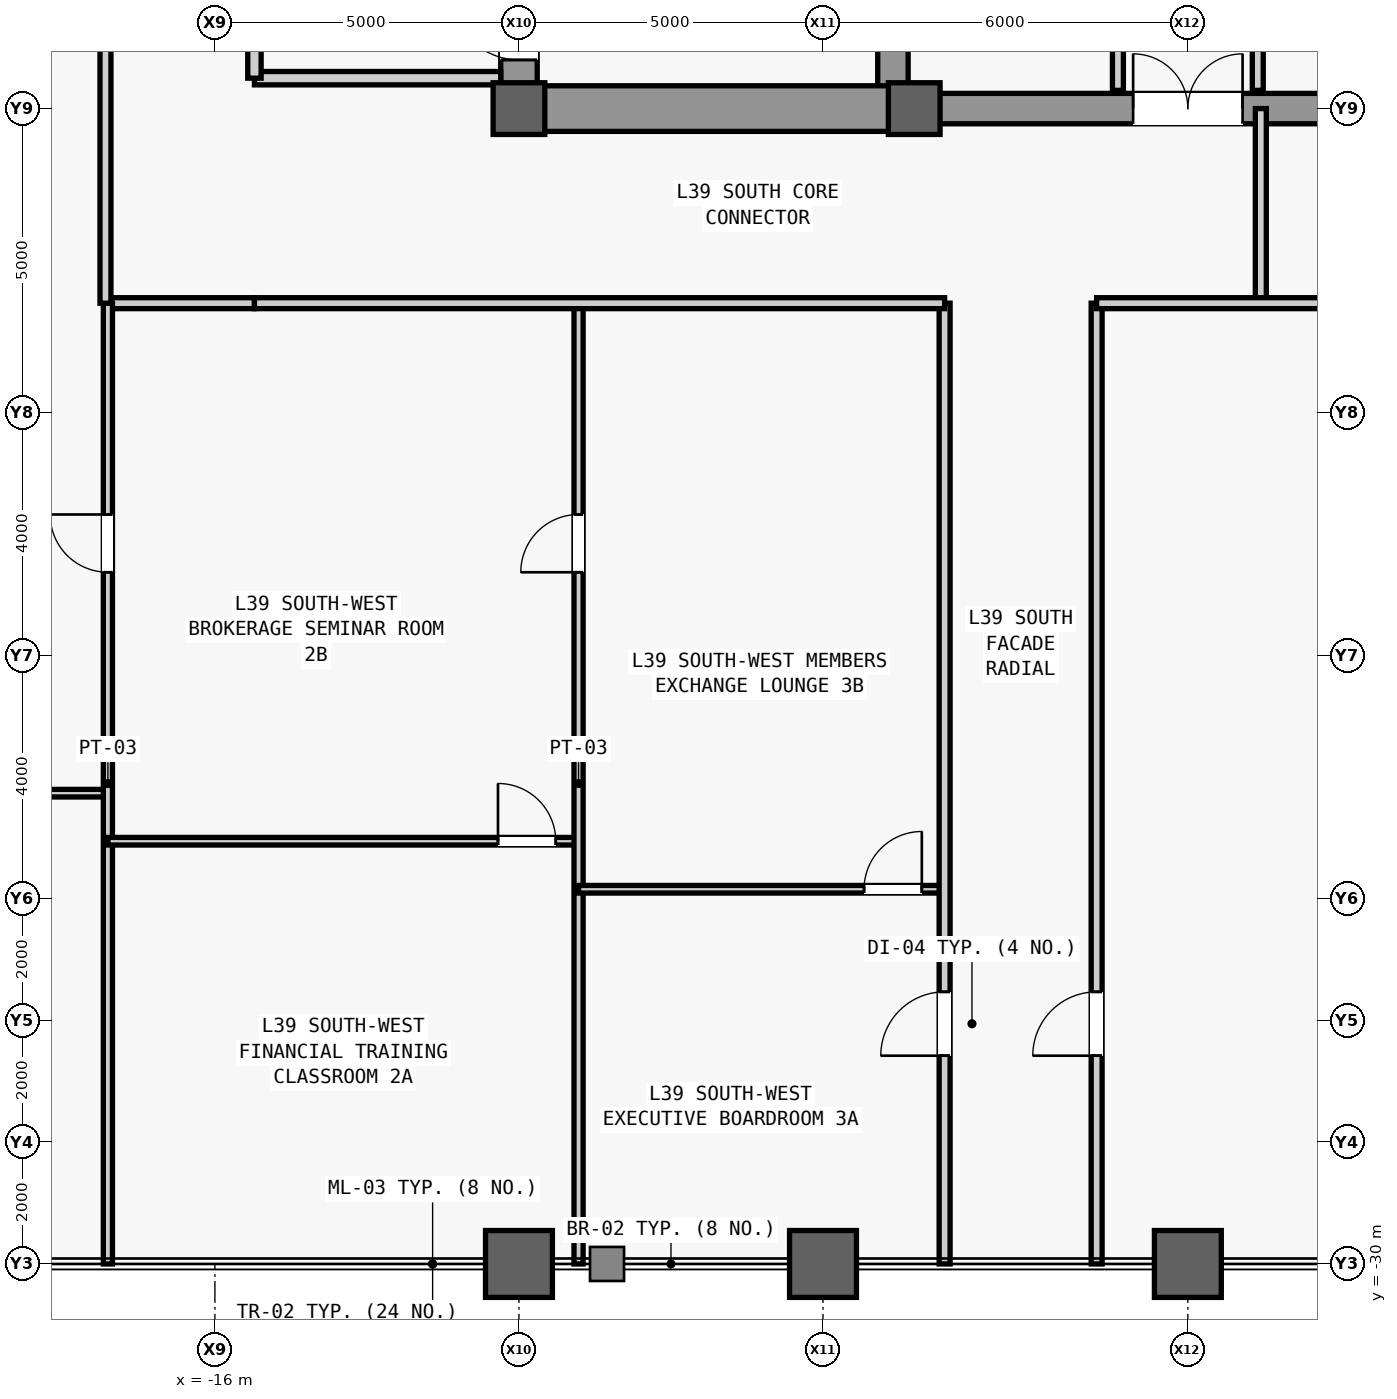
"""IFC4 building model, lengths in metres.
Left out: names, types, materials, properties, quantities, classifications, styles, units other than length and angle.
Written with IfcOpenShell. Run it as: python <this file> out.ifc"""

import sys

from ifc_helpers import new_model, si_unit, direction, frame, frame_2d, origin, origin_2d, place, context, subcontext, project, spatial, rectangle, hollow_rectangle, extrude, source, transform, mapped, element, fill, save


model = new_model("IFC4")
c1 = context("Model", 3, precision=1e-05, world=origin(), true_north=direction((0.0, 1.0)))
c2 = subcontext(c1, "Body", "Model", "MODEL_VIEW")
j1 = project(units=[si_unit("LENGTHUNIT", "METRE"), si_unit("PLANEANGLEUNIT", "RADIAN")], contexts=[c1])
p1 = place(None, origin())
s1 = spatial("IfcSite", under=j1, at=p1, CompositionType="ELEMENT")
p2 = place(p1, origin())
s2 = spatial("IfcBuilding", under=s1, at=p2, CompositionType="ELEMENT")
p3 = place(p2, frame((0.0, 0.0, 171.1)))
s3 = spatial("IfcBuildingStorey", under=s2, at=p3, CompositionType="ELEMENT", Elevation=171.1)
m1 = source(origin(), c2, "Body", "SweptSolid", [
    extrude(rectangle(XDim=22.0, YDim=0.6, at=frame_2d((11.0, 0.0))), origin(), (0.0, 0.0, 1.0), 3.78),
])
p4 = place(p3, frame((-11.0, -11.0, 0.0), z_axis=(0.0, 0.0, 1.0), x_axis=(0.0, 1.0, 0.0)))
e1 = element("IfcWall", 1, at=p4, inside=s3, PredefinedType="SHEAR", context=c2, shape_type="MappedRepresentation", body=[
    mapped(m1, transform((0.0, 0.0, 0.0), scale=1.0)),
])
m2 = source(origin(), c2, "Body", "SweptSolid", [
    extrude(rectangle(XDim=1.1, YDim=2.2, at=frame_2d((0.55, 1.1))), frame((0.0, 0.31, 0.0), z_axis=(0.0, -1.0, 0.0), x_axis=(1.0, 0.0, 0.0)), (0.0, 0.0, 1.0), 0.62),
])
p5 = place(p4, frame((0.8, 0.0, 0.0)))
e2 = element("IfcOpeningElement", 2, at=p5, cuts=e1, PredefinedType="OPENING", context=c2, shape_type="MappedRepresentation", body=[
    mapped(m2, transform((0.0, 0.0, 0.0), scale=1.0)),
])
p6 = place(p4, frame((12.5, 0.0, 0.0)))
e3 = element("IfcOpeningElement", 3, at=p6, cuts=e1, PredefinedType="OPENING", context=c2, shape_type="MappedRepresentation", body=[
    mapped(m2, transform((0.0, 0.0, 0.0), scale=1.0)),
])
m3 = source(origin(), c2, "Body", "SweptSolid", [
    extrude(rectangle(XDim=0.9, YDim=2.15, at=frame_2d((0.45, 1.075))), frame((0.0, 0.31, 0.0), z_axis=(0.0, -1.0, 0.0), x_axis=(1.0, 0.0, 0.0)), (0.0, 0.0, 1.0), 0.62),
])
p7 = place(p4, frame((6.85, 0.0, 0.0)))
e4 = element("IfcOpeningElement", 4, at=p7, cuts=e1, PredefinedType="OPENING", context=c2, shape_type="MappedRepresentation", body=[
    mapped(m3, transform((0.0, 0.0, 0.0), scale=1.0)),
])
m4 = source(origin(), c2, "Body", "SweptSolid", [
    extrude(rectangle(XDim=1.3, YDim=2.3, at=frame_2d((0.65, 1.15))), frame((0.0, 0.31, 0.0), z_axis=(0.0, -1.0, 0.0), x_axis=(1.0, 0.0, 0.0)), (0.0, 0.0, 1.0), 0.62),
])
p8 = place(p4, frame((2.7, 0.0, 0.0)))
e5 = element("IfcOpeningElement", 5, at=p8, cuts=e1, PredefinedType="OPENING", context=c2, shape_type="MappedRepresentation", body=[
    mapped(m4, transform((0.0, 0.0, 0.0), scale=1.0)),
])
m5 = source(origin(), c2, "Body", "SweptSolid", [
    extrude(rectangle(XDim=21.4, YDim=0.5, at=frame_2d((10.7, 0.0))), origin(), (0.0, 0.0, 1.0), 3.78),
])
p9 = place(p3, frame((-4.85, -10.7, 0.0), z_axis=(0.0, 0.0, 1.0), x_axis=(0.0, 1.0, 0.0)))
e6 = element("IfcWall", 6, at=p9, inside=s3, PredefinedType="SHEAR", context=c2, shape_type="MappedRepresentation", body=[
    mapped(m5, transform((0.0, 0.0, 0.0), scale=1.0)),
])
m6 = source(origin(), c2, "Body", "SweptSolid", [
    extrude(rectangle(XDim=5.85, YDim=0.75, at=frame_2d((2.925, 0.0))), origin(), (0.0, 0.0, 1.0), 3.78),
])
p10 = place(p3, frame((-10.7, -11.0, 0.0), z_axis=(0.0, 0.0, 1.0), x_axis=(1.0, 0.0, 0.0)))
e7 = element("IfcWall", 7, at=p10, inside=s3, PredefinedType="SHEAR", context=c2, shape_type="MappedRepresentation", body=[
    mapped(m6, transform((0.0, 0.0, 0.0), scale=1.0)),
])
m7 = source(origin(), c2, "Body", "SweptSolid", [
    extrude(rectangle(XDim=9.2, YDim=0.5, at=frame_2d((4.6, 0.0))), origin(), (0.0, 0.0, 1.0), 3.78),
])
p11 = place(p3, frame((-4.6, -11.0, 0.0), z_axis=(0.0, 0.0, 1.0), x_axis=(1.0, 0.0, 0.0)))
e8 = element("IfcWall", 8, at=p11, inside=s3, PredefinedType="SHEAR", context=c2, shape_type="MappedRepresentation", body=[
    mapped(m7, transform((0.0, 0.0, 0.0), scale=1.0)),
])
m8 = source(origin(), c2, "Body", "SweptSolid", [
    extrude(rectangle(XDim=1.8, YDim=2.25, at=frame_2d((0.9, 1.125))), frame((0.0, 0.26, 0.0), z_axis=(0.0, -1.0, 0.0), x_axis=(1.0, 0.0, 0.0)), (0.0, 0.0, 1.0), 0.52),
])
p12 = place(p11, frame((3.7, 0.0, 0.0)))
e9 = element("IfcOpeningElement", 9, at=p12, cuts=e8, PredefinedType="OPENING", context=c2, shape_type="MappedRepresentation", body=[
    mapped(m8, transform((0.0, 0.0, 0.0), scale=1.0)),
])
m9 = source(origin(), c2, "Body", "SweptSolid", [
    extrude(hollow_rectangle(XDim=1.1, YDim=1.1, WallThickness=0.06, at=origin_2d()), origin(), (0.0, 0.0, 1.0), 4.0),
])
p13 = place(p3, frame((-11.0, -30.0, 0.0), z_axis=(0.0, 0.0, 1.0), x_axis=(1.0, 0.0, 0.0)))
e10 = element("IfcColumn", 10, at=p13, inside=s3, PredefinedType="COLUMN", context=c2, shape_type="MappedRepresentation", body=[
    mapped(m9, transform((0.0, 0.0, 0.0), scale=1.0)),
])
m10 = source(origin(), c2, "Body", "SweptSolid", [
    extrude(rectangle(XDim=0.85, YDim=0.85, at=origin_2d()), origin(), (0.0, 0.0, 1.0), 4.0),
])
p14 = place(p3, frame((-11.0, -11.0, 0.0), z_axis=(0.0, 0.0, 1.0), x_axis=(1.0, 0.0, 0.0)))
e11 = element("IfcColumn", 11, at=p14, inside=s3, PredefinedType="COLUMN", context=c2, shape_type="MappedRepresentation", body=[
    mapped(m10, transform((0.0, 0.0, 0.0), scale=1.0)),
])
p15 = place(p3, frame((-6.0, -30.0, 0.0), z_axis=(0.0, 0.0, 1.0), x_axis=(1.0, 0.0, 0.0)))
e12 = element("IfcColumn", 12, at=p15, inside=s3, PredefinedType="COLUMN", context=c2, shape_type="MappedRepresentation", body=[
    mapped(m9, transform((0.0, 0.0, 0.0), scale=1.0)),
])
p16 = place(p3, frame((-4.5, -11.0, 0.0), z_axis=(0.0, 0.0, 1.0), x_axis=(1.0, 0.0, 0.0)))
e13 = element("IfcColumn", 13, at=p16, inside=s3, PredefinedType="COLUMN", context=c2, shape_type="MappedRepresentation", body=[
    mapped(m10, transform((0.0, 0.0, 0.0), scale=1.0)),
])
p17 = place(p3, frame((0.0, -30.0, 0.0), z_axis=(0.0, 0.0, 1.0), x_axis=(1.0, 0.0, 0.0)))
e14 = element("IfcColumn", 14, at=p17, inside=s3, PredefinedType="COLUMN", context=c2, shape_type="MappedRepresentation", body=[
    mapped(m9, transform((0.0, 0.0, 0.0), scale=1.0)),
])
m11 = source(origin(), c2, "Body", "SweptSolid", [
    extrude(rectangle(XDim=4.05, YDim=0.22, at=frame_2d((2.025, 0.0))), origin(), (0.0, 0.0, 1.0), 3.78),
])
p18 = place(p3, frame((-15.35, -10.5, 0.0), z_axis=(0.0, 0.0, 1.0), x_axis=(1.0, 0.0, 0.0)))
e15 = element("IfcWall", 15, at=p18, inside=s3, PredefinedType="PARTITIONING", context=c2, shape_type="MappedRepresentation", body=[
    mapped(m11, transform((0.0, 0.0, 0.0), scale=1.0)),
])
m12 = source(origin(), c2, "Body", "SweptSolid", [
    extrude(rectangle(XDim=4.4, YDim=0.22, at=frame_2d((2.2, 0.0))), origin(), (0.0, 0.0, 1.0), 3.78),
])
p19 = place(p3, frame((-15.35, -10.5, 0.0), z_axis=(0.0, 0.0, 1.0), x_axis=(0.0, 1.0, 0.0)))
e16 = element("IfcWall", 16, at=p19, inside=s3, PredefinedType="PARTITIONING", context=c2, shape_type="MappedRepresentation", body=[
    mapped(m12, transform((0.0, 0.0, 0.0), scale=1.0)),
])
m13 = source(origin(), c2, "Body", "SweptSolid", [
    extrude(rectangle(XDim=1.2, YDim=2.2, at=frame_2d((0.6, 1.1))), frame((0.0, 0.12, 0.0), z_axis=(0.0, -1.0, 0.0), x_axis=(1.0, 0.0, 0.0)), (0.0, 0.0, 1.0), 0.24),
])
p20 = place(p19, frame((1.6, 0.0, 0.0)))
e17 = element("IfcOpeningElement", 17, at=p20, cuts=e16, PredefinedType="OPENING", context=c2, shape_type="MappedRepresentation", body=[
    mapped(m13, transform((0.0, 0.0, 0.0), scale=1.0)),
])
m14 = source(origin(), c2, "Body", "SweptSolid", [
    extrude(rectangle(XDim=5.4, YDim=0.18, at=frame_2d((2.7, 0.0))), origin(), (0.0, 0.0, 1.0), 3.78),
])
p21 = place(p3, frame((-1.15, -10.7, 0.0), z_axis=(0.0, 0.0, 1.0), x_axis=(0.0, 1.0, 0.0)))
e18 = element("IfcWall", 18, at=p21, inside=s3, PredefinedType="PARTITIONING", context=c2, shape_type="MappedRepresentation", body=[
    mapped(m14, transform((0.0, 0.0, 0.0), scale=1.0)),
])
m15 = source(origin(), c2, "Body", "SweptSolid", [
    extrude(rectangle(XDim=0.9, YDim=2.15, at=frame_2d((0.45, 1.075))), frame((0.0, 0.1, 0.0), z_axis=(0.0, -1.0, 0.0), x_axis=(1.0, 0.0, 0.0)), (0.0, 0.0, 1.0), 0.2),
])
p22 = place(p21, frame((0.9, 0.0, 0.0)))
e19 = element("IfcOpeningElement", 19, at=p22, cuts=e18, PredefinedType="OPENING", context=c2, shape_type="MappedRepresentation", body=[
    mapped(m15, transform((0.0, 0.0, 0.0), scale=1.0)),
])
p23 = place(p21, frame((3.6, 0.0, 0.0)))
e20 = element("IfcOpeningElement", 20, at=p23, cuts=e18, PredefinedType="OPENING", context=c2, shape_type="MappedRepresentation", body=[
    mapped(m15, transform((0.0, 0.0, 0.0), scale=1.0)),
])
p24 = place(p3, frame((1.15, -10.7, 0.0), z_axis=(0.0, 0.0, 1.0), x_axis=(0.0, 1.0, 0.0)))
e21 = element("IfcWall", 21, at=p24, inside=s3, PredefinedType="PARTITIONING", context=c2, shape_type="MappedRepresentation", body=[
    mapped(m14, transform((0.0, 0.0, 0.0), scale=1.0)),
])
p25 = place(p24, frame((2.25, 0.0, 0.0)))
e22 = element("IfcOpeningElement", 22, at=p25, cuts=e21, PredefinedType="OPENING", context=c2, shape_type="MappedRepresentation", body=[
    mapped(m15, transform((0.0, 0.0, 0.0), scale=1.0)),
])
m16 = source(origin(), c2, "Body", "SweptSolid", [
    extrude(rectangle(XDim=2.45, YDim=0.18, at=frame_2d((1.225, 0.0))), origin(), (0.0, 0.0, 1.0), 3.78),
])
p26 = place(p3, frame((-17.8, -14.2, 0.0), z_axis=(0.0, 0.0, 1.0), x_axis=(1.0, 0.0, 0.0)))
e23 = element("IfcWall", 23, at=p26, inside=s3, PredefinedType="PARTITIONING", context=c2, shape_type="MappedRepresentation", body=[
    mapped(m16, transform((0.0, 0.0, 0.0), scale=1.0)),
])
m17 = source(origin(), c2, "Body", "SweptSolid", [
    extrude(rectangle(XDim=3.2, YDim=0.18, at=frame_2d((1.6, 0.0))), origin(), (0.0, 0.0, 1.0), 3.78),
])
p27 = place(p3, frame((1.2, -14.2, 0.0), z_axis=(0.0, 0.0, 1.0), x_axis=(0.0, 1.0, 0.0)))
e24 = element("IfcWall", 24, at=p27, inside=s3, PredefinedType="PARTITIONING", context=c2, shape_type="MappedRepresentation", body=[
    mapped(m17, transform((0.0, 0.0, 0.0), scale=1.0)),
])
m18 = source(origin(), c2, "Body", "SweptSolid", [
    extrude(rectangle(XDim=7.74, YDim=0.125, at=frame_2d((3.87, 0.0))), origin(), (0.0, 0.0, 1.0), 3.78),
])
p28 = place(p3, frame((-25.5, -22.258, 0.0), z_axis=(0.0, 0.0, 1.0), x_axis=(1.0, 0.0, 0.0)))
e25 = element("IfcWall", 25, at=p28, inside=s3, PredefinedType="PARTITIONING", context=c2, shape_type="MappedRepresentation", body=[
    mapped(m18, transform((0.0, 0.0, 0.0), scale=1.0)),
])
m19 = source(origin(), c2, "Body", "SweptSolid", [
    extrude(rectangle(XDim=0.95, YDim=2.15, at=frame_2d((0.475, 1.075))), frame((0.0, 0.073, 0.0), z_axis=(0.0, -1.0, 0.0), x_axis=(1.0, 0.0, 0.0)), (0.0, 0.0, 1.0), 0.145),
])
p29 = place(p28, frame((2.002, 0.0, 0.0)))
e26 = element("IfcOpeningElement", 26, at=p29, cuts=e25, PredefinedType="OPENING", context=c2, shape_type="MappedRepresentation", body=[
    mapped(m19, transform((0.0, 0.0, 0.0), scale=1.0)),
])
m20 = source(origin(), c2, "Body", "SweptSolid", [
    extrude(rectangle(XDim=15.8, YDim=0.15, at=frame_2d((7.9, 0.0))), origin(), (0.0, 0.0, 1.0), 3.78),
])
p30 = place(p3, frame((-17.76, -30.0, 0.0), z_axis=(0.0, 0.0, 1.0), x_axis=(0.0, 1.0, 0.0)))
e27 = element("IfcWall", 27, at=p30, inside=s3, PredefinedType="PARTITIONING", context=c2, shape_type="MappedRepresentation", body=[
    mapped(m20, transform((0.0, 0.0, 0.0), scale=1.0)),
])
m21 = source(origin(), c2, "Body", "SweptSolid", [
    extrude(rectangle(XDim=0.95, YDim=2.15, at=frame_2d((0.475, 1.075))), frame((0.0, 0.085, 0.0), z_axis=(0.0, -1.0, 0.0), x_axis=(1.0, 0.0, 0.0)), (0.0, 0.0, 1.0), 0.17),
])
p31 = place(p30, frame((11.375, 0.0, 0.0)))
e28 = element("IfcOpeningElement", 28, at=p31, cuts=e27, PredefinedType="OPENING", context=c2, shape_type="MappedRepresentation", body=[
    mapped(m21, transform((0.0, 0.0, 0.0), scale=1.0)),
])
p32 = place(p3, frame((-17.76, -23.048, 0.0), z_axis=(0.0, 0.0, 1.0), x_axis=(1.0, 0.0, 0.0)))
e29 = element("IfcWall", 29, at=p32, inside=s3, PredefinedType="PARTITIONING", context=c2, shape_type="MappedRepresentation", body=[
    mapped(m18, transform((0.0, 0.0, 0.0), scale=1.0)),
])
p33 = place(p32, frame((6.415, 0.0, 0.0)))
e30 = element("IfcOpeningElement", 30, at=p33, cuts=e29, PredefinedType="OPENING", context=c2, shape_type="MappedRepresentation", body=[
    mapped(m19, transform((0.0, 0.0, 0.0), scale=1.0)),
])
p34 = place(p3, frame((-10.02, -30.0, 0.0), z_axis=(0.0, 0.0, 1.0), x_axis=(0.0, 1.0, 0.0)))
e31 = element("IfcWall", 31, at=p34, inside=s3, PredefinedType="PARTITIONING", context=c2, shape_type="MappedRepresentation", body=[
    mapped(m20, transform((0.0, 0.0, 0.0), scale=1.0)),
])
p35 = place(p34, frame((11.375, 0.0, 0.0)))
e32 = element("IfcOpeningElement", 32, at=p35, cuts=e31, PredefinedType="OPENING", context=c2, shape_type="MappedRepresentation", body=[
    mapped(m21, transform((0.0, 0.0, 0.0), scale=1.0)),
])
m22 = source(origin(), c2, "Body", "SweptSolid", [
    extrude(rectangle(XDim=6.02, YDim=0.125, at=frame_2d((3.01, 0.0))), origin(), (0.0, 0.0, 1.0), 3.78),
])
p36 = place(p3, frame((-10.02, -23.838, 0.0), z_axis=(0.0, 0.0, 1.0), x_axis=(1.0, 0.0, 0.0)))
e33 = element("IfcWall", 33, at=p36, inside=s3, PredefinedType="PARTITIONING", context=c2, shape_type="MappedRepresentation", body=[
    mapped(m22, transform((0.0, 0.0, 0.0), scale=1.0)),
])
p37 = place(p36, frame((4.695, 0.0, 0.0)))
e34 = element("IfcOpeningElement", 34, at=p37, cuts=e33, PredefinedType="OPENING", context=c2, shape_type="MappedRepresentation", body=[
    mapped(m19, transform((0.0, 0.0, 0.0), scale=1.0)),
])
m23 = source(origin(), c2, "Body", "SweptSolid", [
    extrude(rectangle(XDim=15.8, YDim=0.18, at=frame_2d((7.9, 0.0))), origin(), (0.0, 0.0, 1.0), 3.78),
])
p38 = place(p3, frame((-4.0, -30.0, 0.0), z_axis=(0.0, 0.0, 1.0), x_axis=(0.0, 1.0, 0.0)))
e35 = element("IfcWall", 35, at=p38, inside=s3, PredefinedType="PARTITIONING", context=c2, shape_type="MappedRepresentation", body=[
    mapped(m23, transform((0.0, 0.0, 0.0), scale=1.0)),
])
m24 = source(origin(), c2, "Body", "SweptSolid", [
    extrude(rectangle(XDim=1.05, YDim=2.2, at=frame_2d((0.525, 1.1))), frame((0.0, 0.1, 0.0), z_axis=(0.0, -1.0, 0.0), x_axis=(1.0, 0.0, 0.0)), (0.0, 0.0, 1.0), 0.2),
])
p39 = place(p38, frame((3.425, 0.0, 0.0)))
e36 = element("IfcOpeningElement", 36, at=p39, cuts=e35, PredefinedType="OPENING", context=c2, shape_type="MappedRepresentation", body=[
    mapped(m24, transform((0.0, 0.0, 0.0), scale=1.0)),
])
m25 = source(origin(), c2, "Body", "SweptSolid", [
    extrude(rectangle(XDim=11.35, YDim=0.18, at=frame_2d((5.675, 0.0))), origin(), (0.0, 0.0, 1.0), 3.78),
])
p40 = place(p3, frame((-15.35, -14.2, 0.0), z_axis=(0.0, 0.0, 1.0), x_axis=(1.0, 0.0, 0.0)))
e37 = element("IfcWall", 37, at=p40, inside=s3, PredefinedType="PARTITIONING", context=c2, shape_type="MappedRepresentation", body=[
    mapped(m25, transform((0.0, 0.0, 0.0), scale=1.0)),
])
p41 = place(p3, frame((-1.5, -30.0, 0.0), z_axis=(0.0, 0.0, 1.0), x_axis=(0.0, 1.0, 0.0)))
e38 = element("IfcWall", 38, at=p41, inside=s3, PredefinedType="PARTITIONING", context=c2, shape_type="MappedRepresentation", body=[
    mapped(m23, transform((0.0, 0.0, 0.0), scale=1.0)),
])
p42 = place(p41, frame((3.425, 0.0, 0.0)))
e39 = element("IfcOpeningElement", 39, at=p42, cuts=e38, PredefinedType="OPENING", context=c2, shape_type="MappedRepresentation", body=[
    mapped(m24, transform((0.0, 0.0, 0.0), scale=1.0)),
])
m26 = source(origin(), c2, "Body", "SweptSolid", [
    extrude(rectangle(XDim=16.85, YDim=0.18, at=frame_2d((8.425, 0.0))), origin(), (0.0, 0.0, 1.0), 3.78),
])
p43 = place(p3, frame((-1.5, -14.2, 0.0), z_axis=(0.0, 0.0, 1.0), x_axis=(1.0, 0.0, 0.0)))
e40 = element("IfcWall", 40, at=p43, inside=s3, PredefinedType="PARTITIONING", context=c2, shape_type="MappedRepresentation", body=[
    mapped(m26, transform((0.0, 0.0, 0.0), scale=1.0)),
])
m27 = source(origin(), c2, "Body", "SweptSolid", [
    extrude(rectangle(XDim=9.05, YDim=0.18, at=frame_2d((4.525, 0.0))), origin(), (0.0, 0.0, 1.0), 3.78),
])
p44 = place(p3, frame((-17.8, -14.2, 0.0), z_axis=(0.0, 0.0, 1.0), x_axis=(0.0, 1.0, 0.0)))
e41 = element("IfcWall", 41, at=p44, inside=s3, PredefinedType="PARTITIONING", context=c2, shape_type="MappedRepresentation", body=[
    mapped(m27, transform((0.0, 0.0, 0.0), scale=1.0)),
])
m28 = source(origin(), c2, "Body", "SweptSolid", [
    extrude(rectangle(XDim=1.1, YDim=2.2, at=frame_2d((0.55, 1.1))), frame((0.0, 0.025, 0.0), z_axis=(0.0, -1.0, 0.0), x_axis=(1.0, 0.0, 0.0)), (0.0, 0.0, 1.0), 0.05),
])
p45 = place(p5, origin())
e42 = element("IfcDoor", 42, at=p45, inside=s3, OperationType="SINGLE_SWING_RIGHT", PredefinedType="DOOR", context=c2, shape_type="MappedRepresentation", body=[
    mapped(m28, transform((0.0, 0.0, 0.0), scale=1.0)),
])
fill(e2, e42)
m29 = source(origin(), c2, "Body", "SweptSolid", [
    extrude(rectangle(XDim=1.8, YDim=2.25, at=frame_2d((0.9, 1.125))), frame((0.0, 0.025, 0.0), z_axis=(0.0, -1.0, 0.0), x_axis=(1.0, 0.0, 0.0)), (0.0, 0.0, 1.0), 0.05),
])
p46 = place(p12, origin())
e43 = element("IfcDoor", 43, at=p46, inside=s3, OperationType="SINGLE_SWING_LEFT", PredefinedType="DOOR", context=c2, shape_type="MappedRepresentation", body=[
    mapped(m29, transform((0.0, 0.0, 0.0), scale=1.0)),
])
fill(e9, e43)
m30 = source(origin(), c2, "Body", "SweptSolid", [
    extrude(rectangle(XDim=0.95, YDim=2.15, at=frame_2d((0.475, 1.075))), frame((0.0, 0.025, 0.0), z_axis=(0.0, -1.0, 0.0), x_axis=(1.0, 0.0, 0.0)), (0.0, 0.0, 1.0), 0.05),
])
p47 = place(p31, origin())
e44 = element("IfcDoor", 44, at=p47, inside=s3, OperationType="SINGLE_SWING_RIGHT", PredefinedType="DOOR", context=c2, shape_type="MappedRepresentation", body=[
    mapped(m30, transform((0.0, 0.0, 0.0), scale=1.0)),
])
fill(e28, e44)
p48 = place(p33, origin())
e45 = element("IfcDoor", 45, at=p48, inside=s3, OperationType="SINGLE_SWING_LEFT", PredefinedType="DOOR", context=c2, shape_type="MappedRepresentation", body=[
    mapped(m30, transform((0.0, 0.0, 0.0), scale=1.0)),
])
fill(e30, e45)
p49 = place(p35, origin())
e46 = element("IfcDoor", 46, at=p49, inside=s3, OperationType="SINGLE_SWING_LEFT", PredefinedType="DOOR", context=c2, shape_type="MappedRepresentation", body=[
    mapped(m30, transform((0.0, 0.0, 0.0), scale=1.0)),
])
fill(e32, e46)
p50 = place(p37, origin())
e47 = element("IfcDoor", 47, at=p50, inside=s3, OperationType="SINGLE_SWING_RIGHT", PredefinedType="DOOR", context=c2, shape_type="MappedRepresentation", body=[
    mapped(m30, transform((0.0, 0.0, 0.0), scale=1.0)),
])
fill(e34, e47)
m31 = source(origin(), c2, "Body", "SweptSolid", [
    extrude(rectangle(XDim=1.05, YDim=2.2, at=frame_2d((0.525, 1.1))), frame((0.0, 0.025, 0.0), z_axis=(0.0, -1.0, 0.0), x_axis=(1.0, 0.0, 0.0)), (0.0, 0.0, 1.0), 0.05),
])
p51 = place(p39, origin())
e48 = element("IfcDoor", 48, at=p51, inside=s3, OperationType="SINGLE_SWING_LEFT", PredefinedType="DOOR", context=c2, shape_type="MappedRepresentation", body=[
    mapped(m31, transform((0.0, 0.0, 0.0), scale=1.0)),
])
fill(e36, e48)
p52 = place(p42, origin())
e49 = element("IfcDoor", 49, at=p52, inside=s3, OperationType="SINGLE_SWING_LEFT", PredefinedType="DOOR", context=c2, shape_type="MappedRepresentation", body=[
    mapped(m31, transform((0.0, 0.0, 0.0), scale=1.0)),
])
fill(e39, e49)
save(model, sys.argv[1])
